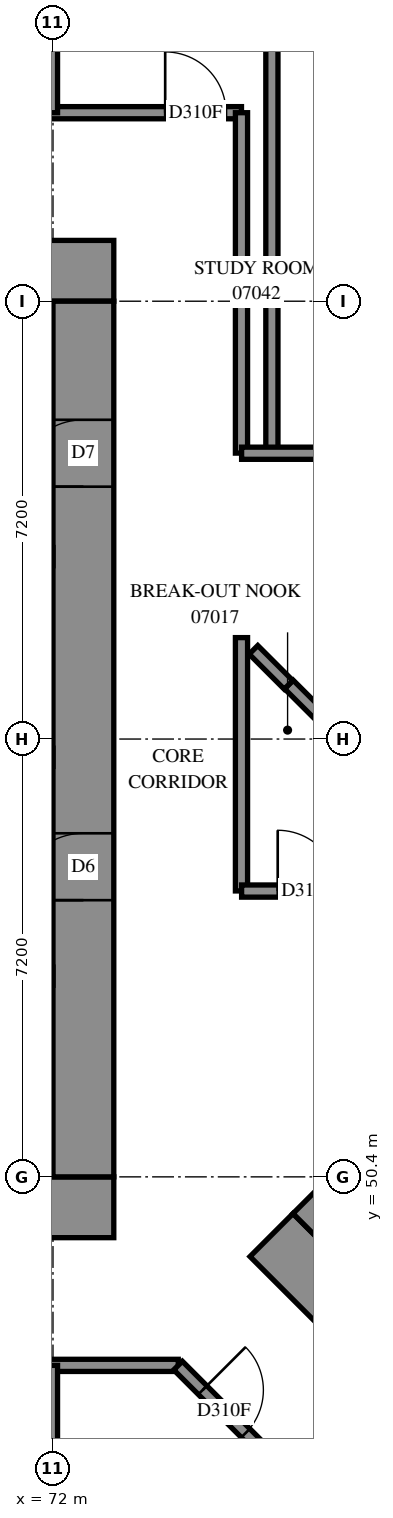
"""IFC4 building model, lengths in metres.
Left out: names, types, materials, properties, quantities, classifications, styles, units other than length and angle.
Written with IfcOpenShell. Run it as: python <this file> out.ifc"""

import sys

from ifc_helpers import new_model, si_unit, direction, frame, frame_2d, origin, place, context, subcontext, project, spatial, rectangle, extrude, element, fill, save


model = new_model("IFC4")
c1 = context("Model", 3, precision=1e-05, world=origin(), true_north=direction((0.0, 1.0)))
c2 = subcontext(c1, "Body", "Model", "MODEL_VIEW")
j1 = project(units=[si_unit("LENGTHUNIT", "METRE"), si_unit("PLANEANGLEUNIT", "RADIAN")], contexts=[c1])
p1 = place(None, origin())
s1 = spatial("IfcSite", under=j1, at=p1, CompositionType="ELEMENT")
p2 = place(p1, origin())
s2 = spatial("IfcBuilding", under=s1, at=p2, CompositionType="ELEMENT")
p3 = place(p2, frame((0.0, 0.0, 30.4)))
s3 = spatial("IfcBuildingStorey", under=s2, at=p3, CompositionType="ELEMENT", Elevation=30.4)
p4 = place(p3, frame((56.6, 49.9, -0.3), z_axis=(0.0, 0.0, 1.0), x_axis=(1.0, 0.0, 0.0)))
e1 = element("IfcWall", 1, at=p4, inside=s3, PredefinedType="SHEAR", context=c2, shape_type="SweptSolid", body=[
    extrude(rectangle(XDim=16.4, YDim=1.0, at=frame_2d((8.2, 0.0))), origin(), (0.0, 0.0, 1.0), 2.7),
])
p5 = place(p3, frame((56.6, 65.3, -0.3), z_axis=(0.0, 0.0, 1.0), x_axis=(1.0, 0.0, 0.0)))
e2 = element("IfcWall", 2, at=p5, inside=s3, PredefinedType="SHEAR", context=c2, shape_type="SweptSolid", body=[
    extrude(rectangle(XDim=16.4, YDim=1.0, at=frame_2d((8.2, 0.0))), origin(), (0.0, 0.0, 1.0), 2.7),
])
p6 = place(p5, frame((11.0, 0.0, 0.3)))
e3 = element("IfcOpeningElement", 3, at=p6, cuts=e2, PredefinedType="OPENING", context=c2, shape_type="SweptSolid", body=[
    extrude(rectangle(XDim=0.8, YDim=2.1, at=frame_2d((0.4, 1.05))), frame((0.0, 0.51, 0.0), z_axis=(0.0, -1.0, 0.0), x_axis=(1.0, 0.0, 0.0)), (0.0, 0.0, 1.0), 1.02),
])
p7 = place(p3, frame((72.5, 50.4, -0.3), z_axis=(0.0, 0.0, 1.0), x_axis=(0.0, 1.0, 0.0)))
e4 = element("IfcWall", 4, at=p7, inside=s3, PredefinedType="SHEAR", context=c2, shape_type="SweptSolid", body=[
    extrude(rectangle(XDim=14.4, YDim=1.0, at=frame_2d((7.2, 0.0))), origin(), (0.0, 0.0, 1.0), 2.7),
])
p8 = place(p7, frame((4.55, 0.0, 0.3)))
e5 = element("IfcOpeningElement", 5, at=p8, cuts=e4, PredefinedType="OPENING", context=c2, shape_type="SweptSolid", body=[
    extrude(rectangle(XDim=1.1, YDim=2.1, at=frame_2d((0.55, 1.05))), frame((0.0, 0.51, 0.0), z_axis=(0.0, -1.0, 0.0), x_axis=(1.0, 0.0, 0.0)), (0.0, 0.0, 1.0), 1.02),
])
p9 = place(p7, frame((11.35, 0.0, 0.3)))
e6 = element("IfcOpeningElement", 6, at=p9, cuts=e4, PredefinedType="OPENING", context=c2, shape_type="SweptSolid", body=[
    extrude(rectangle(XDim=1.1, YDim=2.1, at=frame_2d((0.55, 1.05))), frame((0.0, 0.51, 0.0), z_axis=(0.0, -1.0, 0.0), x_axis=(1.0, 0.0, 0.0)), (0.0, 0.0, 1.0), 1.02),
])
p10 = place(p3, frame((75.594, 49.443, -0.3), z_axis=(0.0, 0.0, 1.0), x_axis=(0.7071037324, -0.70710983, 0.0)))
e7 = element("IfcWall", 7, at=p10, inside=s3, PredefinedType="SHEAR", context=c2, shape_type="SweptSolid", body=[
    extrude(rectangle(XDim=16.4, YDim=1.0, at=frame_2d((8.2, 0.0))), origin(), (0.0, 0.0, 1.0), 2.7),
])
p11 = place(p3, frame((76.301, 49.443, -0.3), z_axis=(0.0, 0.0, 1.0), x_axis=(0.7071067812, 0.7071067812, 0.0)))
e8 = element("IfcWall", 8, at=p11, inside=s3, PredefinedType="SHEAR", context=c2, shape_type="SweptSolid", body=[
    extrude(rectangle(XDim=14.4, YDim=1.0, at=frame_2d((7.2, 0.0))), origin(), (0.0, 0.0, 1.0), 2.7),
])
p12 = place(p11, frame((4.55, 0.0, 0.3)))
e9 = element("IfcOpeningElement", 9, at=p12, cuts=e8, PredefinedType="OPENING", context=c2, shape_type="SweptSolid", body=[
    extrude(rectangle(XDim=1.1, YDim=2.1, at=frame_2d((0.55, 1.05))), frame((0.0, 0.51, 0.0), z_axis=(0.0, -1.0, 0.0), x_axis=(1.0, 0.0, 0.0)), (0.0, 0.0, 1.0), 1.02),
])
p13 = place(p11, frame((11.35, 0.0, 0.3)))
e10 = element("IfcOpeningElement", 10, at=p13, cuts=e8, PredefinedType="OPENING", context=c2, shape_type="SweptSolid", body=[
    extrude(rectangle(XDim=1.1, YDim=2.1, at=frame_2d((0.55, 1.05))), frame((0.0, 0.51, 0.0), z_axis=(0.0, -1.0, 0.0), x_axis=(1.0, 0.0, 0.0)), (0.0, 0.0, 1.0), 1.02),
])
p14 = place(p3, frame((54.5, 67.9, 0.0), z_axis=(0.0, 0.0, 1.0), x_axis=(1.0, 0.0, 0.0)))
e11 = element("IfcWall", 11, at=p14, inside=s3, PredefinedType="PARTITIONING", context=c2, shape_type="SweptSolid", body=[
    extrude(rectangle(XDim=20.6, YDim=0.2, at=frame_2d((10.3, 0.0))), origin(), (0.0, 0.0, 1.0), 3.1),
])
p15 = place(p14, frame((0.255, 0.0, 0.0)))
e12 = element("IfcOpeningElement", 12, at=p15, cuts=e11, PredefinedType="OPENING", context=c2, shape_type="SweptSolid", body=[
    extrude(rectangle(XDim=1.0, YDim=2.1, at=frame_2d((0.5, 1.05))), frame((0.0, 0.11, 0.0), z_axis=(0.0, -1.0, 0.0), x_axis=(1.0, 0.0, 0.0)), (0.0, 0.0, 1.0), 0.22),
])
p16 = place(p14, frame((19.345, 0.0, 0.0)))
e13 = element("IfcOpeningElement", 13, at=p16, cuts=e11, PredefinedType="OPENING", context=c2, shape_type="SweptSolid", body=[
    extrude(rectangle(XDim=1.0, YDim=2.1, at=frame_2d((0.5, 1.05))), frame((0.0, 0.11, 0.0), z_axis=(0.0, -1.0, 0.0), x_axis=(1.0, 0.0, 0.0)), (0.0, 0.0, 1.0), 0.22),
])
p17 = place(p14, frame((5.45, 0.0, 0.0)))
e14 = element("IfcOpeningElement", 14, at=p17, cuts=e11, PredefinedType="OPENING", context=c2, shape_type="SweptSolid", body=[
    extrude(rectangle(XDim=0.9, YDim=2.1, at=frame_2d((0.45, 1.05))), frame((0.0, 0.11, 0.0), z_axis=(0.0, -1.0, 0.0), x_axis=(1.0, 0.0, 0.0)), (0.0, 0.0, 1.0), 0.22),
])
p18 = place(p14, frame((7.1, 0.0, 0.0)))
e15 = element("IfcOpeningElement", 15, at=p18, cuts=e11, PredefinedType="OPENING", context=c2, shape_type="SweptSolid", body=[
    extrude(rectangle(XDim=0.9, YDim=2.1, at=frame_2d((0.45, 1.05))), frame((0.0, 0.11, 0.0), z_axis=(0.0, -1.0, 0.0), x_axis=(1.0, 0.0, 0.0)), (0.0, 0.0, 1.0), 0.22),
])
p19 = place(p14, frame((12.65, 0.0, 0.0)))
e16 = element("IfcOpeningElement", 16, at=p19, cuts=e11, PredefinedType="OPENING", context=c2, shape_type="SweptSolid", body=[
    extrude(rectangle(XDim=0.9, YDim=2.1, at=frame_2d((0.45, 1.05))), frame((0.0, 0.11, 0.0), z_axis=(0.0, -1.0, 0.0), x_axis=(1.0, 0.0, 0.0)), (0.0, 0.0, 1.0), 0.22),
])
p20 = place(p14, frame((14.3, 0.0, 0.0)))
e17 = element("IfcOpeningElement", 17, at=p20, cuts=e11, PredefinedType="OPENING", context=c2, shape_type="SweptSolid", body=[
    extrude(rectangle(XDim=0.9, YDim=2.1, at=frame_2d((0.45, 1.05))), frame((0.0, 0.11, 0.0), z_axis=(0.0, -1.0, 0.0), x_axis=(1.0, 0.0, 0.0)), (0.0, 0.0, 1.0), 0.22),
])
p21 = place(p3, frame((54.5, 47.3, 0.0), z_axis=(0.0, 0.0, 1.0), x_axis=(1.0, 0.0, 0.0)))
e18 = element("IfcWall", 18, at=p21, inside=s3, PredefinedType="PARTITIONING", context=c2, shape_type="SweptSolid", body=[
    extrude(rectangle(XDim=19.56, YDim=0.2, at=frame_2d((9.78, 0.0))), origin(), (0.0, 0.0, 1.0), 3.1),
])
p22 = place(p21, frame((0.243, 0.0, 0.0)))
e19 = element("IfcOpeningElement", 19, at=p22, cuts=e18, PredefinedType="OPENING", context=c2, shape_type="SweptSolid", body=[
    extrude(rectangle(XDim=1.0, YDim=2.1, at=frame_2d((0.5, 1.05))), frame((0.0, 0.11, 0.0), z_axis=(0.0, -1.0, 0.0), x_axis=(1.0, 0.0, 0.0)), (0.0, 0.0, 1.0), 0.22),
])
p23 = place(p21, frame((5.4, 0.0, 0.0)))
e20 = element("IfcOpeningElement", 20, at=p23, cuts=e18, PredefinedType="OPENING", context=c2, shape_type="SweptSolid", body=[
    extrude(rectangle(XDim=0.9, YDim=2.1, at=frame_2d((0.45, 1.05))), frame((0.0, 0.11, 0.0), z_axis=(0.0, -1.0, 0.0), x_axis=(1.0, 0.0, 0.0)), (0.0, 0.0, 1.0), 0.22),
])
p24 = place(p21, frame((7.1, 0.0, 0.0)))
e21 = element("IfcOpeningElement", 21, at=p24, cuts=e18, PredefinedType="OPENING", context=c2, shape_type="SweptSolid", body=[
    extrude(rectangle(XDim=0.9, YDim=2.1, at=frame_2d((0.45, 1.05))), frame((0.0, 0.11, 0.0), z_axis=(0.0, -1.0, 0.0), x_axis=(1.0, 0.0, 0.0)), (0.0, 0.0, 1.0), 0.22),
])
p25 = place(p21, frame((12.6, 0.0, 0.0)))
e22 = element("IfcOpeningElement", 22, at=p25, cuts=e18, PredefinedType="OPENING", context=c2, shape_type="SweptSolid", body=[
    extrude(rectangle(XDim=0.9, YDim=2.1, at=frame_2d((0.45, 1.05))), frame((0.0, 0.11, 0.0), z_axis=(0.0, -1.0, 0.0), x_axis=(1.0, 0.0, 0.0)), (0.0, 0.0, 1.0), 0.22),
])
p26 = place(p21, frame((14.3, 0.0, 0.0)))
e23 = element("IfcOpeningElement", 23, at=p26, cuts=e18, PredefinedType="OPENING", context=c2, shape_type="SweptSolid", body=[
    extrude(rectangle(XDim=0.9, YDim=2.1, at=frame_2d((0.45, 1.05))), frame((0.0, 0.11, 0.0), z_axis=(0.0, -1.0, 0.0), x_axis=(1.0, 0.0, 0.0)), (0.0, 0.0, 1.0), 0.22),
])
p27 = place(p3, frame((75.6, 62.3, 0.0), z_axis=(0.0, 0.0, 1.0), x_axis=(0.0, 1.0, 0.0)))
e24 = element("IfcWall", 24, at=p27, inside=s3, PredefinedType="PARTITIONING", context=c2, shape_type="SweptSolid", body=[
    extrude(rectangle(XDim=10.408, YDim=0.2, at=frame_2d((5.204, 0.0))), origin(), (0.0, 0.0, 1.0), 3.1),
])
p28 = place(p3, frame((75.1, 62.302, 0.0), z_axis=(0.0, 0.0, 1.0), x_axis=(0.0, 1.0, 0.0)))
e25 = element("IfcWall", 25, at=p28, inside=s3, PredefinedType="PARTITIONING", context=c2, shape_type="SweptSolid", body=[
    extrude(rectangle(XDim=5.598, YDim=0.2, at=frame_2d((2.799, 0.0))), origin(), (0.0, 0.0, 1.0), 3.1),
])
p29 = place(p3, frame((74.057, 47.297, 0.0), z_axis=(0.0, 0.0, 1.0), x_axis=(0.7071067812, -0.7071067812, 0.0)))
e26 = element("IfcWall", 26, at=p29, inside=s3, PredefinedType="PARTITIONING", context=c2, shape_type="SweptSolid", body=[
    extrude(rectangle(XDim=4.653, YDim=0.2, at=frame_2d((2.326, 0.0))), origin(), (0.0, 0.0, 1.0), 3.1),
])
p30 = place(p29, frame((0.57, 0.0, 0.0)))
e27 = element("IfcOpeningElement", 27, at=p30, cuts=e26, PredefinedType="OPENING", context=c2, shape_type="SweptSolid", body=[
    extrude(rectangle(XDim=1.0, YDim=2.1, at=frame_2d((0.5, 1.05))), frame((0.0, 0.11, 0.0), z_axis=(0.0, -1.0, 0.0), x_axis=(1.0, 0.0, 0.0)), (0.0, 0.0, 1.0), 0.22),
])
p31 = place(p3, frame((75.1, 55.102, 0.0), z_axis=(0.0, 0.0, 1.0), x_axis=(0.0, 1.0, 0.0)))
e28 = element("IfcWall", 28, at=p31, inside=s3, PredefinedType="PARTITIONING", context=c2, shape_type="SweptSolid", body=[
    extrude(rectangle(XDim=4.166, YDim=0.2, at=frame_2d((2.083, 0.0))), origin(), (0.0, 0.0, 1.0), 3.1),
])
p32 = place(p3, frame((75.102, 62.3, 0.0), z_axis=(0.0, 0.0, 1.0), x_axis=(1.0, 0.0, 0.0)))
e29 = element("IfcWall", 29, at=p32, inside=s3, PredefinedType="PARTITIONING", context=c2, shape_type="SweptSolid", body=[
    extrude(rectangle(XDim=4.098, YDim=0.2, at=frame_2d((2.049, 0.0))), origin(), (0.0, 0.0, 1.0), 3.1),
])
p33 = place(p3, frame((75.102, 55.1, 0.0), z_axis=(0.0, 0.0, 1.0), x_axis=(1.0, 0.0, 0.0)))
e30 = element("IfcWall", 30, at=p33, inside=s3, PredefinedType="PARTITIONING", context=c2, shape_type="SweptSolid", body=[
    extrude(rectangle(XDim=3.178, YDim=0.2, at=frame_2d((1.589, 0.0))), origin(), (0.0, 0.0, 1.0), 3.1),
])
p34 = place(p33, frame((0.594, 0.0, 0.0)))
e31 = element("IfcOpeningElement", 31, at=p34, cuts=e30, PredefinedType="OPENING", context=c2, shape_type="SweptSolid", body=[
    extrude(rectangle(XDim=1.0, YDim=2.1, at=frame_2d((0.5, 1.05))), frame((0.0, 0.11, 0.0), z_axis=(0.0, -1.0, 0.0), x_axis=(1.0, 0.0, 0.0)), (0.0, 0.0, 1.0), 0.22),
])
for number, where, z_axis, x_axis in (
    (32, (72.0, 44.9, 0.0), (0.0, 0.0, 1.0), (0.0, 1.0, 0.0)),
    (33, (72.0, 67.9, 0.0), (0.0, 0.0, 1.0), (0.0, 1.0, 0.0)),
):
    element("IfcWall", number, at=place(p3, frame(where, z_axis=z_axis, x_axis=x_axis)), inside=s3, PredefinedType="PARTITIONING", context=c2, shape_type="SweptSolid", body=[
        extrude(rectangle(XDim=2.4, YDim=0.15, at=frame_2d((1.2, 0.0))), origin(), (0.0, 0.0, 1.0), 3.1),
    ])
p35 = place(p3, frame((75.879, 58.497, 0.0), z_axis=(0.0, 0.0, 1.0), x_axis=(0.7075866635, -0.706626573, 0.0)))
e34 = element("IfcWall", 34, at=p35, inside=s3, PredefinedType="PARTITIONING", context=c2, shape_type="SweptSolid", body=[
    extrude(rectangle(XDim=2.083, YDim=0.2, at=frame_2d((1.042, 0.0))), origin(), (0.0, 0.0, 1.0), 3.1),
])
p36 = place(p3, frame((75.297, 59.067, 0.0), z_axis=(0.0, 0.0, 1.0), x_axis=(0.7071067812, -0.7071067812, 0.0)))
e35 = element("IfcWall", 35, at=p36, inside=s3, PredefinedType="PARTITIONING", context=c2, shape_type="SweptSolid", body=[
    extrude(rectangle(XDim=0.815, YDim=0.2, at=frame_2d((0.407, 0.0))), origin(), (0.0, 0.0, 1.0), 3.1),
])
p37 = place(p8, origin())
e36 = element("IfcDoor", 36, at=p37, inside=s3, OperationType="DOUBLE_DOOR_SINGLE_SWING", PredefinedType="DOOR", context=c2, shape_type="SweptSolid", body=[
    extrude(rectangle(XDim=1.1, YDim=2.1, at=frame_2d((0.55, 1.05))), frame((0.0, 0.025, 0.0), z_axis=(0.0, -1.0, 0.0), x_axis=(1.0, 0.0, 0.0)), (0.0, 0.0, 1.0), 0.05),
])
fill(e5, e36)
p38 = place(p9, origin())
e37 = element("IfcDoor", 37, at=p38, inside=s3, OperationType="SINGLE_SWING_RIGHT", PredefinedType="DOOR", context=c2, shape_type="SweptSolid", body=[
    extrude(rectangle(XDim=1.1, YDim=2.1, at=frame_2d((0.55, 1.05))), frame((0.0, 0.025, 0.0), z_axis=(0.0, -1.0, 0.0), x_axis=(1.0, 0.0, 0.0)), (0.0, 0.0, 1.0), 0.05),
])
fill(e6, e37)
p39 = place(p34, origin())
e38 = element("IfcDoor", 38, at=p39, inside=s3, OperationType="SINGLE_SWING_LEFT", PredefinedType="DOOR", context=c2, shape_type="SweptSolid", body=[
    extrude(rectangle(XDim=1.0, YDim=2.1, at=frame_2d((0.5, 1.05))), frame((0.0, 0.025, 0.0), z_axis=(0.0, -1.0, 0.0), x_axis=(1.0, 0.0, 0.0)), (0.0, 0.0, 1.0), 0.05),
])
fill(e31, e38)
p40 = place(p16, origin())
e39 = element("IfcDoor", 39, at=p40, inside=s3, OperationType="SINGLE_SWING_RIGHT", PredefinedType="DOOR", context=c2, shape_type="SweptSolid", body=[
    extrude(rectangle(XDim=1.0, YDim=2.1, at=frame_2d((0.5, 1.05))), frame((0.0, 0.025, 0.0), z_axis=(0.0, -1.0, 0.0), x_axis=(1.0, 0.0, 0.0)), (0.0, 0.0, 1.0), 0.05),
])
fill(e13, e39)
p41 = place(p30, origin())
e40 = element("IfcDoor", 40, at=p41, inside=s3, OperationType="SINGLE_SWING_LEFT", PredefinedType="DOOR", context=c2, shape_type="SweptSolid", body=[
    extrude(rectangle(XDim=1.0, YDim=2.1, at=frame_2d((0.5, 1.05))), frame((0.0, 0.025, 0.0), z_axis=(0.0, -1.0, 0.0), x_axis=(1.0, 0.0, 0.0)), (0.0, 0.0, 1.0), 0.05),
])
fill(e27, e40)
save(model, sys.argv[1])
